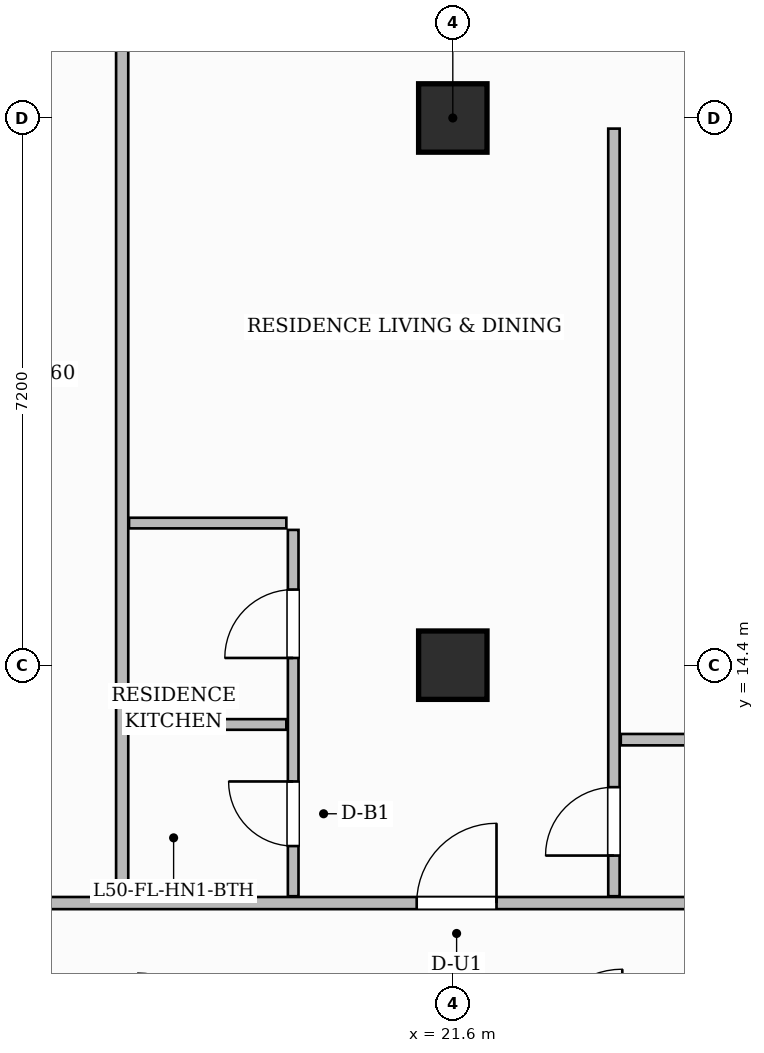
"""IFC4 building model, lengths in metres.
Left out: names, types, materials, properties, quantities, classifications, styles, units other than length and angle.
Written with IfcOpenShell. Run it as: python <this file> out.ifc"""

import sys

from ifc_helpers import new_model, si_unit, direction, frame, frame_2d, origin, origin_2d, place, context, subcontext, project, spatial, rectangle, extrude, source, transform, mapped, element, fill, save


model = new_model("IFC4")
c1 = context("Model", 3, precision=1e-05, world=origin(), true_north=direction((0.0, 1.0)))
c2 = subcontext(c1, "Body", "Model", "MODEL_VIEW")
j1 = project(units=[si_unit("LENGTHUNIT", "METRE"), si_unit("PLANEANGLEUNIT", "RADIAN")], contexts=[c1])
p1 = place(None, origin())
s1 = spatial("IfcSite", under=j1, at=p1, CompositionType="ELEMENT")
p2 = place(p1, origin())
s2 = spatial("IfcBuilding", under=s1, at=p2, CompositionType="ELEMENT")
p3 = place(p2, frame((0.0, 0.0, 201.9)))
s3 = spatial("IfcBuildingStorey", under=s2, at=p3, CompositionType="ELEMENT", Elevation=201.9)
m1 = source(origin(), c2, "Body", "SweptSolid", [
    extrude(rectangle(XDim=0.9, YDim=0.9, at=origin_2d()), origin(), (0.0, 0.0, 1.0), 3.85),
])
for number, where, z_axis, x_axis in (
    (1, (21.6, 14.4, 0.0), (0.0, 0.0, 1.0), (1.0, 0.0, 0.0)),
    (2, (21.6, 21.6, 0.0), (0.0, 0.0, 1.0), (1.0, 0.0, 0.0)),
):
    element("IfcColumn", number, at=place(p3, frame(where, z_axis=z_axis, x_axis=x_axis)), inside=s3, PredefinedType="COLUMN", context=c2, shape_type="MappedRepresentation", body=[
        mapped(m1, transform((0.0, 0.0, 0.0), scale=1.0)),
    ])
p4 = place(p3, frame((14.568, 11.27, 0.0), z_axis=(0.0, 0.0, 1.0), x_axis=(1.0, 0.0, 0.0)))
e3 = element("IfcWall", 3, at=p4, inside=s3, PredefinedType="PARTITIONING", context=c2, shape_type="SweptSolid", body=[
    extrude(rectangle(XDim=15.542, YDim=0.16, at=frame_2d((7.771, 0.0))), origin(), (0.0, 0.0, 1.0), 3.6),
])
p5 = place(p4, frame((6.557, 0.0, 0.0)))
e4 = element("IfcOpeningElement", 4, at=p5, cuts=e3, PredefinedType="OPENING", context=c2, shape_type="SweptSolid", body=[
    extrude(rectangle(XDim=1.05, YDim=2.25, at=frame_2d((0.525, 1.125))), frame((0.0, 0.09, 0.0), z_axis=(0.0, -1.0, 0.0), x_axis=(1.0, 0.0, 0.0)), (0.0, 0.0, 1.0), 0.18),
])
p6 = place(p3, frame((17.25, 11.36, 0.0), z_axis=(0.0, 0.0, 1.0), x_axis=(0.0, 1.0, 0.0)))
e5 = element("IfcWall", 5, at=p6, inside=s3, PredefinedType="PARTITIONING", context=c2, shape_type="SweptSolid", body=[
    extrude(rectangle(XDim=13.75, YDim=0.16, at=frame_2d((6.875, 0.0))), origin(), (0.0, 0.0, 1.0), 3.6),
])
p7 = place(p3, frame((19.5, 11.36, 0.0), z_axis=(0.0, 0.0, 1.0), x_axis=(0.0, 1.0, 0.0)))
e6 = element("IfcWall", 6, at=p7, inside=s3, PredefinedType="PARTITIONING", context=c2, shape_type="SweptSolid", body=[
    extrude(rectangle(XDim=4.82, YDim=0.14, at=frame_2d((2.41, 0.0))), origin(), (0.0, 0.0, 1.0), 3.6),
])
p8 = place(p7, frame((0.66, 0.0, 0.0)))
e7 = element("IfcOpeningElement", 7, at=p8, cuts=e6, PredefinedType="OPENING", context=c2, shape_type="SweptSolid", body=[
    extrude(rectangle(XDim=0.85, YDim=2.1, at=frame_2d((0.425, 1.05))), frame((0.0, 0.08, 0.0), z_axis=(0.0, -1.0, 0.0), x_axis=(1.0, 0.0, 0.0)), (0.0, 0.0, 1.0), 0.16),
])
p9 = place(p7, frame((3.135, 0.0, 0.0)))
e8 = element("IfcOpeningElement", 8, at=p9, cuts=e6, PredefinedType="OPENING", context=c2, shape_type="SweptSolid", body=[
    extrude(rectangle(XDim=0.9, YDim=2.15, at=frame_2d((0.45, 1.075))), frame((0.0, 0.08, 0.0), z_axis=(0.0, -1.0, 0.0), x_axis=(1.0, 0.0, 0.0)), (0.0, 0.0, 1.0), 0.16),
])
for number, where, z_axis, x_axis in (
    (9, (17.34, 13.62, 0.0), (0.0, 0.0, 1.0), (1.0, 0.0, 0.0)),
    (10, (17.34, 16.27, 0.0), (0.0, 0.0, 1.0), (1.0, 0.0, 0.0)),
):
    element("IfcWall", number, at=place(p3, frame(where, z_axis=z_axis, x_axis=x_axis)), inside=s3, PredefinedType="PARTITIONING", context=c2, shape_type="SweptSolid", body=[
        extrude(rectangle(XDim=2.07, YDim=0.14, at=frame_2d((1.035, 0.0))), origin(), (0.0, 0.0, 1.0), 3.6),
    ])
p10 = place(p3, frame((23.72, 11.36, 0.0), z_axis=(0.0, 0.0, 1.0), x_axis=(0.0, 1.0, 0.0)))
e11 = element("IfcWall", 11, at=p10, inside=s3, PredefinedType="PARTITIONING", context=c2, shape_type="SweptSolid", body=[
    extrude(rectangle(XDim=10.1, YDim=0.15, at=frame_2d((5.05, 0.0))), origin(), (0.0, 0.0, 1.0), 3.6),
])
p11 = place(p10, frame((0.535, 0.0, 0.0)))
e12 = element("IfcOpeningElement", 12, at=p11, cuts=e11, PredefinedType="OPENING", context=c2, shape_type="SweptSolid", body=[
    extrude(rectangle(XDim=0.9, YDim=2.15, at=frame_2d((0.45, 1.075))), frame((0.0, 0.085, 0.0), z_axis=(0.0, -1.0, 0.0), x_axis=(1.0, 0.0, 0.0)), (0.0, 0.0, 1.0), 0.17),
])
p12 = place(p3, frame((23.81, 13.42, 0.0), z_axis=(0.0, 0.0, 1.0), x_axis=(1.0, 0.0, 0.0)))
e13 = element("IfcWall", 13, at=p12, inside=s3, PredefinedType="PARTITIONING", context=c2, shape_type="SweptSolid", body=[
    extrude(rectangle(XDim=6.3, YDim=0.15, at=frame_2d((3.15, 0.0))), origin(), (0.0, 0.0, 1.0), 3.6),
])
p13 = place(p12, frame((1.65, 0.0, 0.0)))
e14 = element("IfcOpeningElement", 14, at=p13, cuts=e13, PredefinedType="OPENING", context=c2, shape_type="SweptSolid", body=[
    extrude(rectangle(XDim=0.9, YDim=2.15, at=frame_2d((0.45, 1.075))), frame((0.0, 0.085, 0.0), z_axis=(0.0, -1.0, 0.0), x_axis=(1.0, 0.0, 0.0)), (0.0, 0.0, 1.0), 0.17),
])
m2 = source(origin(), c2, "Body", "SweptSolid", [
    extrude(rectangle(XDim=0.85, YDim=2.1, at=frame_2d((0.425, 1.05))), frame((0.0, 0.025, 0.0), z_axis=(0.0, -1.0, 0.0), x_axis=(1.0, 0.0, 0.0)), (0.0, 0.0, 1.0), 0.05),
])
p14 = place(p8, origin())
e15 = element("IfcDoor", 15, at=p14, inside=s3, OperationType="SINGLE_SWING_RIGHT", PredefinedType="DOOR", context=c2, shape_type="MappedRepresentation", body=[
    mapped(m2, transform((0.0, 0.0, 0.0), scale=1.0)),
])
fill(e7, e15)
m3 = source(origin(), c2, "Body", "SweptSolid", [
    extrude(rectangle(XDim=0.9, YDim=2.15, at=frame_2d((0.45, 1.075))), frame((0.0, 0.025, 0.0), z_axis=(0.0, -1.0, 0.0), x_axis=(1.0, 0.0, 0.0)), (0.0, 0.0, 1.0), 0.05),
])
p15 = place(p9, origin())
e16 = element("IfcDoor", 16, at=p15, inside=s3, OperationType="SINGLE_SWING_LEFT", PredefinedType="DOOR", context=c2, shape_type="MappedRepresentation", body=[
    mapped(m3, transform((0.0, 0.0, 0.0), scale=1.0)),
])
fill(e8, e16)
m4 = source(origin(), c2, "Body", "SweptSolid", [
    extrude(rectangle(XDim=1.05, YDim=2.25, at=frame_2d((0.525, 1.125))), frame((0.0, 0.025, 0.0), z_axis=(0.0, -1.0, 0.0), x_axis=(1.0, 0.0, 0.0)), (0.0, 0.0, 1.0), 0.05),
])
p16 = place(p5, origin())
e17 = element("IfcDoor", 17, at=p16, inside=s3, OperationType="SINGLE_SWING_RIGHT", PredefinedType="DOOR", context=c2, shape_type="MappedRepresentation", body=[
    mapped(m4, transform((0.0, 0.0, 0.0), scale=1.0)),
])
fill(e4, e17)
p17 = place(p11, origin())
e18 = element("IfcDoor", 18, at=p17, inside=s3, OperationType="SINGLE_SWING_LEFT", PredefinedType="DOOR", context=c2, shape_type="MappedRepresentation", body=[
    mapped(m3, transform((0.0, 0.0, 0.0), scale=1.0)),
])
fill(e12, e18)
save(model, sys.argv[1])
